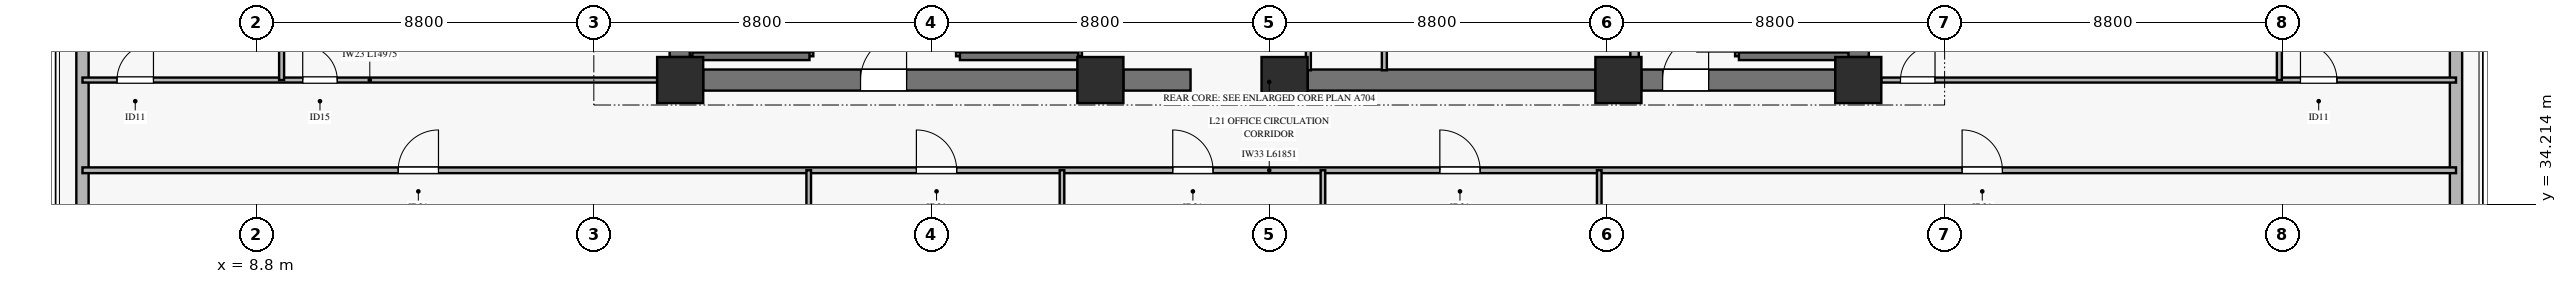
"""IFC4 building model, lengths in metres.
Left out: names, types, materials, properties, quantities, classifications, styles, units other than length and angle.
Written with IfcOpenShell. Run it as: python <this file> out.ifc"""

import sys

from ifc_helpers import new_model, si_unit, direction, frame, frame_2d, origin, origin_2d, place, context, subcontext, project, spatial, rectangle, extrude, source, transform, mapped, element, fill, save


model = new_model("IFC4")
c1 = context("Model", 3, precision=1e-05, world=origin(), true_north=direction((0.0, 1.0)))
c2 = subcontext(c1, "Body", "Model", "MODEL_VIEW")
j1 = project(units=[si_unit("LENGTHUNIT", "METRE"), si_unit("PLANEANGLEUNIT", "RADIAN")], contexts=[c1])
p1 = place(None, origin())
s1 = spatial("IfcSite", under=j1, at=p1, CompositionType="ELEMENT")
p2 = place(p1, origin())
s2 = spatial("IfcBuilding", under=s1, at=p2, CompositionType="ELEMENT")
p3 = place(p2, frame((0.0, 0.0, 87.4)))
s3 = spatial("IfcBuildingStorey", under=s2, at=p3, CompositionType="ELEMENT", Elevation=87.4)
m1 = source(origin(), c2, "Body", "SweptSolid", [
    extrude(rectangle(XDim=1.2, YDim=1.2, at=origin_2d()), origin(), (0.0, 0.0, 1.0), 3.68),
])
for number, where, z_axis, x_axis in (
    (1, (19.85, 37.45, 0.0), (0.0, 0.0, 1.0), (1.0, 0.0, 0.0)),
    (2, (30.8, 37.45, 0.0), (0.0, 0.0, 1.0), (1.0, 0.0, 0.0)),
    (3, (35.6, 37.45, 0.0), (0.0, 0.0, 1.0), (1.0, 0.0, 0.0)),
    (4, (44.3, 37.45, 0.0), (0.0, 0.0, 1.0), (1.0, 0.0, 0.0)),
    (5, (50.55, 37.45, 0.0), (0.0, 0.0, 1.0), (1.0, 0.0, 0.0)),
):
    element("IfcColumn", number, at=place(p3, frame(where, z_axis=z_axis, x_axis=x_axis)), inside=s3, PredefinedType="PILASTER", context=c2, shape_type="MappedRepresentation", body=[
        mapped(m1, transform((0.0, 0.0, 0.0), x_axis=(1.0, 0.0, 0.0), y_axis=(0.0, 1.0, 0.0), z_axis=(0.0, 0.0, 1.0), scale=1.0)),
    ])
p4 = place(p3, frame((20.45, 37.45, 0.0), z_axis=(0.0, 0.0, 1.0), x_axis=(1.0, 0.0, 0.0)))
e6 = element("IfcWall", 6, at=p4, inside=s3, PredefinedType="SHEAR", context=c2, shape_type="SweptSolid", body=[
    extrude(rectangle(XDim=9.75, YDim=0.55, at=frame_2d((4.875, 0.0))), origin(), (0.0, 0.0, 1.0), 3.68),
])
p5 = place(p4, frame((4.1, 0.0, 0.0)))
e7 = element("IfcOpeningElement", 7, at=p5, cuts=e6, PredefinedType="OPENING", context=c2, shape_type="SweptSolid", body=[
    extrude(rectangle(XDim=1.2, YDim=2.15, at=frame_2d((0.6, 1.075))), frame((0.0, 0.285, 0.0), z_axis=(0.0, -1.0, 0.0), x_axis=(1.0, 0.0, 0.0)), (0.0, 0.0, 1.0), 0.57),
])
p6 = place(p3, frame((31.4, 37.45, 0.0), z_axis=(0.0, 0.0, 1.0), x_axis=(1.0, 0.0, 0.0)))
e8 = element("IfcWall", 8, at=p6, inside=s3, PredefinedType="SHEAR", context=c2, shape_type="SweptSolid", body=[
    extrude(rectangle(XDim=1.75, YDim=0.55, at=frame_2d((0.875, 0.0))), origin(), (0.0, 0.0, 1.0), 3.68),
])
p7 = place(p3, frame((36.2, 37.45, 0.0), z_axis=(0.0, 0.0, 1.0), x_axis=(1.0, 0.0, 0.0)))
e9 = element("IfcWall", 9, at=p7, inside=s3, PredefinedType="SHEAR", context=c2, shape_type="SweptSolid", body=[
    extrude(rectangle(XDim=7.5, YDim=0.55, at=frame_2d((3.75, 0.0))), origin(), (0.0, 0.0, 1.0), 3.68),
])
p8 = place(p3, frame((44.9, 37.45, 0.0), z_axis=(0.0, 0.0, 1.0), x_axis=(1.0, 0.0, 0.0)))
e10 = element("IfcWall", 10, at=p8, inside=s3, PredefinedType="SHEAR", context=c2, shape_type="SweptSolid", body=[
    extrude(rectangle(XDim=5.05, YDim=0.55, at=frame_2d((2.525, 0.0))), origin(), (0.0, 0.0, 1.0), 3.68),
])
p9 = place(p8, frame((0.55, 0.0, 0.0)))
e11 = element("IfcOpeningElement", 11, at=p9, cuts=e10, PredefinedType="OPENING", context=c2, shape_type="SweptSolid", body=[
    extrude(rectangle(XDim=1.2, YDim=2.15, at=frame_2d((0.6, 1.075))), frame((0.0, 0.285, 0.0), z_axis=(0.0, -1.0, 0.0), x_axis=(1.0, 0.0, 0.0)), (0.0, 0.0, 1.0), 0.57),
])
for number, where, z_axis, x_axis in (
    (12, (19.85, 38.05, 0.0), (0.0, 0.0, 1.0), (0.0, 1.0, 0.0)),
    (13, (50.55, 38.05, 0.0), (0.0, 0.0, 1.0), (0.0, 1.0, 0.0)),
):
    element("IfcWall", number, at=place(p3, frame(where, z_axis=z_axis, x_axis=x_axis)), inside=s3, PredefinedType="SHEAR", context=c2, shape_type="SweptSolid", body=[
        extrude(rectangle(XDim=7.9, YDim=0.55, at=frame_2d((3.95, 0.0))), origin(), (0.0, 0.0, 1.0), 3.68),
    ])
p10 = place(p3, frame((4.275, 26.518, 0.0), z_axis=(0.0, 0.0, 1.0), x_axis=(0.0, 1.0, 0.0)))
e14 = element("IfcWall", 14, at=p10, inside=s3, PredefinedType="SOLIDWALL", context=c2, shape_type="SweptSolid", body=[
    extrude(rectangle(XDim=16.512, YDim=0.32, at=frame_2d((8.256, 0.0))), origin(), (0.0, 0.0, 1.0), 3.16),
])
p11 = place(p10, frame((4.201, 0.0, 0.45)))
e15 = element("IfcOpeningElement", 15, at=p11, cuts=e14, PredefinedType="OPENING", context=c2, shape_type="SweptSolid", body=[
    extrude(rectangle(XDim=2.4, YDim=2.1, at=frame_2d((1.2, 1.05))), frame((0.0, 0.17, 0.0), z_axis=(0.0, -1.0, 0.0), x_axis=(1.0, 0.0, 0.0)), (0.0, 0.0, 1.0), 0.34),
])
p12 = place(p3, frame((66.126, 26.518, 0.0), z_axis=(0.0, 0.0, 1.0), x_axis=(0.0, 1.0, 0.0)))
e16 = element("IfcWall", 16, at=p12, inside=s3, PredefinedType="SOLIDWALL", context=c2, shape_type="SweptSolid", body=[
    extrude(rectangle(XDim=16.512, YDim=0.32, at=frame_2d((8.256, 0.0))), origin(), (0.0, 0.0, 1.0), 3.16),
])
p13 = place(p12, frame((4.201, 0.0, 0.45)))
e17 = element("IfcOpeningElement", 17, at=p13, cuts=e16, PredefinedType="OPENING", context=c2, shape_type="SweptSolid", body=[
    extrude(rectangle(XDim=2.4, YDim=2.1, at=frame_2d((1.2, 1.05))), frame((0.0, 0.17, 0.0), z_axis=(0.0, -1.0, 0.0), x_axis=(1.0, 0.0, 0.0)), (0.0, 0.0, 1.0), 0.34),
])
p14 = place(p3, frame((20.17, 38.07, 0.0), z_axis=(0.0, 0.0, 1.0), x_axis=(0.0, 1.0, 0.0)))
e18 = element("IfcWall", 18, at=p14, inside=s3, PredefinedType="SOLIDWALL", context=c2, shape_type="SweptSolid", body=[
    extrude(rectangle(XDim=7.25, YDim=0.14, at=frame_2d((3.625, 0.0))), origin(), (0.0, 0.0, 1.0), 3.9),
])
p15 = place(p3, frame((23.22, 38.07, 0.0), z_axis=(0.0, 0.0, 1.0), x_axis=(0.0, 1.0, 0.0)))
e19 = element("IfcWall", 19, at=p15, inside=s3, PredefinedType="SOLIDWALL", context=c2, shape_type="SweptSolid", body=[
    extrude(rectangle(XDim=7.25, YDim=0.2, at=frame_2d((3.625, 0.0))), origin(), (0.0, 0.0, 1.0), 3.9),
])
p16 = place(p15, frame((0.11, 0.0, 0.0)))
e20 = element("IfcOpeningElement", 20, at=p16, cuts=e19, PredefinedType="OPENING", context=c2, shape_type="SweptSolid", body=[
    extrude(rectangle(XDim=1.1, YDim=2.15, at=frame_2d((0.55, 1.075))), frame((0.0, 0.11, 0.0), z_axis=(0.0, -1.0, 0.0), x_axis=(1.0, 0.0, 0.0)), (0.0, 0.0, 1.0), 0.22),
])
p17 = place(p3, frame((20.17, 38.07, 0.0), z_axis=(0.0, 0.0, 1.0), x_axis=(1.0, 0.0, 0.0)))
e21 = element("IfcWall", 21, at=p17, inside=s3, PredefinedType="SOLIDWALL", context=c2, shape_type="SweptSolid", body=[
    extrude(rectangle(XDim=3.05, YDim=0.2, at=frame_2d((1.525, 0.0))), origin(), (0.0, 0.0, 1.0), 3.9),
])
p18 = place(p3, frame((27.14, 38.07, 0.0), z_axis=(0.0, 0.0, 1.0), x_axis=(0.0, 1.0, 0.0)))
e22 = element("IfcWall", 22, at=p18, inside=s3, PredefinedType="SOLIDWALL", context=c2, shape_type="SweptSolid", body=[
    extrude(rectangle(XDim=7.25, YDim=0.2, at=frame_2d((3.625, 0.0))), origin(), (0.0, 0.0, 1.0), 3.9),
])
p19 = place(p18, frame((0.11, 0.0, 0.0)))
e23 = element("IfcOpeningElement", 23, at=p19, cuts=e22, PredefinedType="OPENING", context=c2, shape_type="SweptSolid", body=[
    extrude(rectangle(XDim=1.1, YDim=2.15, at=frame_2d((0.55, 1.075))), frame((0.0, 0.11, 0.0), z_axis=(0.0, -1.0, 0.0), x_axis=(1.0, 0.0, 0.0)), (0.0, 0.0, 1.0), 0.22),
])
p20 = place(p3, frame((30.22, 38.07, 0.0), z_axis=(0.0, 0.0, 1.0), x_axis=(0.0, 1.0, 0.0)))
e24 = element("IfcWall", 24, at=p20, inside=s3, PredefinedType="SOLIDWALL", context=c2, shape_type="SweptSolid", body=[
    extrude(rectangle(XDim=7.25, YDim=0.2, at=frame_2d((3.625, 0.0))), origin(), (0.0, 0.0, 1.0), 3.9),
])
p21 = place(p3, frame((27.14, 38.07, 0.0), z_axis=(0.0, 0.0, 1.0), x_axis=(1.0, 0.0, 0.0)))
e25 = element("IfcWall", 25, at=p21, inside=s3, PredefinedType="SOLIDWALL", context=c2, shape_type="SweptSolid", body=[
    extrude(rectangle(XDim=3.08, YDim=0.2, at=frame_2d((1.54, 0.0))), origin(), (0.0, 0.0, 1.0), 3.9),
])
p22 = place(p3, frame((47.44, 38.07, 0.0), z_axis=(0.0, 0.0, 1.0), x_axis=(0.0, 1.0, 0.0)))
e26 = element("IfcWall", 26, at=p22, inside=s3, PredefinedType="SOLIDWALL", context=c2, shape_type="SweptSolid", body=[
    extrude(rectangle(XDim=7.25, YDim=0.2, at=frame_2d((3.625, 0.0))), origin(), (0.0, 0.0, 1.0), 3.9),
])
p23 = place(p22, frame((0.11, 0.0, 0.0)))
e27 = element("IfcOpeningElement", 27, at=p23, cuts=e26, PredefinedType="OPENING", context=c2, shape_type="SweptSolid", body=[
    extrude(rectangle(XDim=1.1, YDim=2.15, at=frame_2d((0.55, 1.075))), frame((0.0, 0.11, 0.0), z_axis=(0.0, -1.0, 0.0), x_axis=(1.0, 0.0, 0.0)), (0.0, 0.0, 1.0), 0.22),
])
p24 = place(p3, frame((47.44, 38.07, 0.0), z_axis=(0.0, 0.0, 1.0), x_axis=(1.0, 0.0, 0.0)))
e28 = element("IfcWall", 28, at=p24, inside=s3, PredefinedType="SOLIDWALL", context=c2, shape_type="SweptSolid", body=[
    extrude(rectangle(XDim=2.855, YDim=0.2, at=frame_2d((1.427, 0.0))), origin(), (0.0, 0.0, 1.0), 3.9),
])
p25 = place(p3, frame((44.72, 37.705, 0.0), z_axis=(0.0, 0.0, 1.0), x_axis=(0.0, 1.0, 0.0)))
e29 = element("IfcWall", 29, at=p25, inside=s3, PredefinedType="SOLIDWALL", context=c2, shape_type="SweptSolid", body=[
    extrude(rectangle(XDim=7.515, YDim=0.22, at=frame_2d((3.757, 0.0))), origin(), (0.0, 0.0, 1.0), 3.68),
])
p26 = place(p3, frame((36.22, 37.705, 0.0), z_axis=(0.0, 0.0, 1.0), x_axis=(0.0, 1.0, 0.0)))
e30 = element("IfcWall", 30, at=p26, inside=s3, PredefinedType="PARTITIONING", context=c2, shape_type="SweptSolid", body=[
    extrude(rectangle(XDim=2.215, YDim=0.13, at=frame_2d((1.107, 0.0))), origin(), (0.0, 0.0, 1.0), 3.68),
])
p27 = place(p26, frame((0.905, 0.0, 0.0)))
e31 = element("IfcOpeningElement", 31, at=p27, cuts=e30, PredefinedType="OPENING", context=c2, shape_type="SweptSolid", body=[
    extrude(rectangle(XDim=0.9, YDim=2.1, at=frame_2d((0.45, 1.05))), frame((0.0, 0.075, 0.0), z_axis=(0.0, -1.0, 0.0), x_axis=(1.0, 0.0, 0.0)), (0.0, 0.0, 1.0), 0.15),
])
p28 = place(p3, frame((38.2, 37.705, 0.0), z_axis=(0.0, 0.0, 1.0), x_axis=(0.0, 1.0, 0.0)))
e32 = element("IfcWall", 32, at=p28, inside=s3, PredefinedType="PARTITIONING", context=c2, shape_type="SweptSolid", body=[
    extrude(rectangle(XDim=2.215, YDim=0.13, at=frame_2d((1.107, 0.0))), origin(), (0.0, 0.0, 1.0), 3.68),
])
p29 = place(p28, frame((0.615, 0.0, 0.0)))
e33 = element("IfcOpeningElement", 33, at=p29, cuts=e32, PredefinedType="OPENING", context=c2, shape_type="SweptSolid", body=[
    extrude(rectangle(XDim=0.9, YDim=2.1, at=frame_2d((0.45, 1.05))), frame((0.0, 0.075, 0.0), z_axis=(0.0, -1.0, 0.0), x_axis=(1.0, 0.0, 0.0)), (0.0, 0.0, 1.0), 0.15),
])
p30 = place(p3, frame((4.275, 35.1, 0.0), z_axis=(0.0, 0.0, 1.0), x_axis=(1.0, 0.0, 0.0)))
e34 = element("IfcWall", 34, at=p30, inside=s3, PredefinedType="PARTITIONING", context=c2, shape_type="SweptSolid", body=[
    extrude(rectangle(XDim=61.851, YDim=0.15, at=frame_2d((30.926, 0.0))), origin(), (0.0, 0.0, 1.0), 2.765),
])
p31 = place(p30, frame((8.227, 0.0, 0.0)))
e35 = element("IfcOpeningElement", 35, at=p31, cuts=e34, PredefinedType="OPENING", context=c2, shape_type="SweptSolid", body=[
    extrude(rectangle(XDim=1.05, YDim=2.15, at=frame_2d((0.525, 1.075))), frame((0.0, 0.085, 0.0), z_axis=(0.0, -1.0, 0.0), x_axis=(1.0, 0.0, 0.0)), (0.0, 0.0, 1.0), 0.17),
])
p32 = place(p30, frame((21.731, 0.0, 0.0)))
e36 = element("IfcOpeningElement", 36, at=p32, cuts=e34, PredefinedType="OPENING", context=c2, shape_type="SweptSolid", body=[
    extrude(rectangle(XDim=1.05, YDim=2.15, at=frame_2d((0.525, 1.075))), frame((0.0, 0.085, 0.0), z_axis=(0.0, -1.0, 0.0), x_axis=(1.0, 0.0, 0.0)), (0.0, 0.0, 1.0), 0.17),
])
p33 = place(p30, frame((28.411, 0.0, 0.0)))
e37 = element("IfcOpeningElement", 37, at=p33, cuts=e34, PredefinedType="OPENING", context=c2, shape_type="SweptSolid", body=[
    extrude(rectangle(XDim=1.05, YDim=2.15, at=frame_2d((0.525, 1.075))), frame((0.0, 0.085, 0.0), z_axis=(0.0, -1.0, 0.0), x_axis=(1.0, 0.0, 0.0)), (0.0, 0.0, 1.0), 0.17),
])
p34 = place(p30, frame((35.371, 0.0, 0.0)))
e38 = element("IfcOpeningElement", 38, at=p34, cuts=e34, PredefinedType="OPENING", context=c2, shape_type="SweptSolid", body=[
    extrude(rectangle(XDim=1.05, YDim=2.15, at=frame_2d((0.525, 1.075))), frame((0.0, 0.085, 0.0), z_axis=(0.0, -1.0, 0.0), x_axis=(1.0, 0.0, 0.0)), (0.0, 0.0, 1.0), 0.17),
])
p35 = place(p30, frame((48.981, 0.0, 0.0)))
e39 = element("IfcOpeningElement", 39, at=p35, cuts=e34, PredefinedType="OPENING", context=c2, shape_type="SweptSolid", body=[
    extrude(rectangle(XDim=1.05, YDim=2.15, at=frame_2d((0.525, 1.075))), frame((0.0, 0.085, 0.0), z_axis=(0.0, -1.0, 0.0), x_axis=(1.0, 0.0, 0.0)), (0.0, 0.0, 1.0), 0.17),
])
for number, where, z_axis, x_axis in (
    (40, (23.2, 5.936, 0.0), (0.0, 0.0, 1.0), (0.0, 1.0, 0.0)),
    (41, (29.8, 5.936, 0.0), (0.0, 0.0, 1.0), (0.0, 1.0, 0.0)),
    (42, (36.6, 5.936, 0.0), (0.0, 0.0, 1.0), (0.0, 1.0, 0.0)),
):
    element("IfcWall", number, at=place(p3, frame(where, z_axis=z_axis, x_axis=x_axis)), inside=s3, PredefinedType="PARTITIONING", context=c2, shape_type="SweptSolid", body=[
        extrude(rectangle(XDim=29.164, YDim=0.12, at=frame_2d((14.582, 0.0))), origin(), (0.0, 0.0, 1.0), 3.165),
    ])
p36 = place(p3, frame((43.8, 5.936, 0.0), z_axis=(0.0, 0.0, 1.0), x_axis=(0.0, 1.0, 0.0)))
e43 = element("IfcWall", 43, at=p36, inside=s3, PredefinedType="PARTITIONING", context=c2, shape_type="SweptSolid", body=[
    extrude(rectangle(XDim=29.164, YDim=0.12, at=frame_2d((14.582, 0.0))), origin(), (0.0, 0.0, 1.0), 3.215),
])
p37 = place(p3, frame((4.275, 37.45, 0.0), z_axis=(0.0, 0.0, 1.0), x_axis=(1.0, 0.0, 0.0)))
e44 = element("IfcWall", 44, at=p37, inside=s3, PredefinedType="PARTITIONING", context=c2, shape_type="SweptSolid", body=[
    extrude(rectangle(XDim=14.975, YDim=0.13, at=frame_2d((7.488, 0.0))), origin(), (0.0, 0.0, 1.0), 3.165),
])
p38 = place(p37, frame((0.9, 0.0, 0.0)))
e45 = element("IfcOpeningElement", 45, at=p38, cuts=e44, PredefinedType="OPENING", context=c2, shape_type="SweptSolid", body=[
    extrude(rectangle(XDim=0.95, YDim=2.1, at=frame_2d((0.475, 1.05))), frame((0.0, 0.075, 0.0), z_axis=(0.0, -1.0, 0.0), x_axis=(1.0, 0.0, 0.0)), (0.0, 0.0, 1.0), 0.15),
])
p39 = place(p37, frame((5.739, 0.0, 0.0)))
e46 = element("IfcOpeningElement", 46, at=p39, cuts=e44, PredefinedType="OPENING", context=c2, shape_type="SweptSolid", body=[
    extrude(rectangle(XDim=0.9, YDim=2.1, at=frame_2d((0.45, 1.05))), frame((0.0, 0.075, 0.0), z_axis=(0.0, -1.0, 0.0), x_axis=(1.0, 0.0, 0.0)), (0.0, 0.0, 1.0), 0.15),
])
p40 = place(p3, frame((9.464, 37.45, 0.0), z_axis=(0.0, 0.0, 1.0), x_axis=(0.0, 1.0, 0.0)))
e47 = element("IfcWall", 47, at=p40, inside=s3, PredefinedType="PARTITIONING", context=c2, shape_type="SweptSolid", body=[
    extrude(rectangle(XDim=8.8, YDim=0.13, at=frame_2d((4.4, 0.0))), origin(), (0.0, 0.0, 1.0), 3.68),
])
p41 = place(p3, frame((51.15, 37.45, 0.0), z_axis=(0.0, 0.0, 1.0), x_axis=(1.0, 0.0, 0.0)))
e48 = element("IfcWall", 48, at=p41, inside=s3, PredefinedType="PARTITIONING", context=c2, shape_type="SweptSolid", body=[
    extrude(rectangle(XDim=14.976, YDim=0.13, at=frame_2d((7.488, 0.0))), origin(), (0.0, 0.0, 1.0), 3.165),
])
p42 = place(p41, frame((0.5, 0.0, 0.0)))
e49 = element("IfcOpeningElement", 49, at=p42, cuts=e48, PredefinedType="OPENING", context=c2, shape_type="SweptSolid", body=[
    extrude(rectangle(XDim=0.9, YDim=2.1, at=frame_2d((0.45, 1.05))), frame((0.0, 0.075, 0.0), z_axis=(0.0, -1.0, 0.0), x_axis=(1.0, 0.0, 0.0)), (0.0, 0.0, 1.0), 0.15),
])
p43 = place(p41, frame((10.923, 0.0, 0.0)))
e50 = element("IfcOpeningElement", 50, at=p43, cuts=e48, PredefinedType="OPENING", context=c2, shape_type="SweptSolid", body=[
    extrude(rectangle(XDim=0.95, YDim=2.1, at=frame_2d((0.475, 1.05))), frame((0.0, 0.075, 0.0), z_axis=(0.0, -1.0, 0.0), x_axis=(1.0, 0.0, 0.0)), (0.0, 0.0, 1.0), 0.15),
])
p44 = place(p3, frame((61.523, 37.45, 0.0), z_axis=(0.0, 0.0, 1.0), x_axis=(0.0, 1.0, 0.0)))
e51 = element("IfcWall", 51, at=p44, inside=s3, PredefinedType="PARTITIONING", context=c2, shape_type="SweptSolid", body=[
    extrude(rectangle(XDim=8.8, YDim=0.13, at=frame_2d((4.4, 0.0))), origin(), (0.0, 0.0, 1.0), 3.68),
])
m2 = source(origin(), c2, "Body", "SweptSolid", [
    extrude(rectangle(XDim=1.2, YDim=2.15, at=frame_2d((0.6, 1.075))), frame((0.0, 0.025, 0.0), z_axis=(0.0, -1.0, 0.0), x_axis=(1.0, 0.0, 0.0)), (0.0, 0.0, 1.0), 0.05),
])
p45 = place(p5, origin())
e52 = element("IfcDoor", 52, at=p45, inside=s3, OperationType="SINGLE_SWING_RIGHT", PredefinedType="DOOR", context=c2, shape_type="MappedRepresentation", body=[
    mapped(m2, transform((0.0, 0.0, 0.0), x_axis=(1.0, 0.0, 0.0), y_axis=(0.0, 1.0, 0.0), z_axis=(0.0, 0.0, 1.0), scale=1.0)),
])
fill(e7, e52)
p46 = place(p9, origin())
e53 = element("IfcDoor", 53, at=p46, inside=s3, OperationType="SINGLE_SWING_RIGHT", PredefinedType="DOOR", context=c2, shape_type="MappedRepresentation", body=[
    mapped(m2, transform((0.0, 0.0, 0.0), x_axis=(1.0, 0.0, 0.0), y_axis=(0.0, 1.0, 0.0), z_axis=(0.0, 0.0, 1.0), scale=1.0)),
])
fill(e11, e53)
m3 = source(origin(), c2, "Body", "SweptSolid", [
    extrude(rectangle(XDim=1.05, YDim=2.15, at=frame_2d((0.525, 1.075))), frame((0.0, 0.025, 0.0), z_axis=(0.0, -1.0, 0.0), x_axis=(1.0, 0.0, 0.0)), (0.0, 0.0, 1.0), 0.05),
])
p47 = place(p31, origin())
e54 = element("IfcDoor", 54, at=p47, inside=s3, OperationType="SINGLE_SWING_RIGHT", PredefinedType="DOOR", context=c2, shape_type="MappedRepresentation", body=[
    mapped(m3, transform((0.0, 0.0, 0.0), x_axis=(1.0, 0.0, 0.0), y_axis=(0.0, 1.0, 0.0), z_axis=(0.0, 0.0, 1.0), scale=1.0)),
])
fill(e35, e54)
p48 = place(p32, origin())
e55 = element("IfcDoor", 55, at=p48, inside=s3, OperationType="SINGLE_SWING_LEFT", PredefinedType="DOOR", context=c2, shape_type="MappedRepresentation", body=[
    mapped(m3, transform((0.0, 0.0, 0.0), x_axis=(1.0, 0.0, 0.0), y_axis=(0.0, 1.0, 0.0), z_axis=(0.0, 0.0, 1.0), scale=1.0)),
])
fill(e36, e55)
p49 = place(p33, origin())
e56 = element("IfcDoor", 56, at=p49, inside=s3, OperationType="SINGLE_SWING_LEFT", PredefinedType="DOOR", context=c2, shape_type="MappedRepresentation", body=[
    mapped(m3, transform((0.0, 0.0, 0.0), x_axis=(1.0, 0.0, 0.0), y_axis=(0.0, 1.0, 0.0), z_axis=(0.0, 0.0, 1.0), scale=1.0)),
])
fill(e37, e56)
p50 = place(p34, origin())
e57 = element("IfcDoor", 57, at=p50, inside=s3, OperationType="SINGLE_SWING_LEFT", PredefinedType="DOOR", context=c2, shape_type="MappedRepresentation", body=[
    mapped(m3, transform((0.0, 0.0, 0.0), x_axis=(1.0, 0.0, 0.0), y_axis=(0.0, 1.0, 0.0), z_axis=(0.0, 0.0, 1.0), scale=1.0)),
])
fill(e38, e57)
p51 = place(p35, origin())
e58 = element("IfcDoor", 58, at=p51, inside=s3, OperationType="SINGLE_SWING_LEFT", PredefinedType="DOOR", context=c2, shape_type="MappedRepresentation", body=[
    mapped(m3, transform((0.0, 0.0, 0.0), x_axis=(1.0, 0.0, 0.0), y_axis=(0.0, 1.0, 0.0), z_axis=(0.0, 0.0, 1.0), scale=1.0)),
])
fill(e39, e58)
m4 = source(origin(), c2, "Body", "SweptSolid", [
    extrude(rectangle(XDim=0.95, YDim=2.1, at=frame_2d((0.475, 1.05))), frame((0.0, 0.025, 0.0), z_axis=(0.0, -1.0, 0.0), x_axis=(1.0, 0.0, 0.0)), (0.0, 0.0, 1.0), 0.05),
])
p52 = place(p38, origin())
e59 = element("IfcDoor", 59, at=p52, inside=s3, OperationType="SINGLE_SWING_RIGHT", PredefinedType="DOOR", context=c2, shape_type="MappedRepresentation", body=[
    mapped(m4, transform((0.0, 0.0, 0.0), x_axis=(1.0, 0.0, 0.0), y_axis=(0.0, 1.0, 0.0), z_axis=(0.0, 0.0, 1.0), scale=1.0)),
])
fill(e45, e59)
m5 = source(origin(), c2, "Body", "SweptSolid", [
    extrude(rectangle(XDim=0.9, YDim=2.1, at=frame_2d((0.45, 1.05))), frame((0.0, 0.025, 0.0), z_axis=(0.0, -1.0, 0.0), x_axis=(1.0, 0.0, 0.0)), (0.0, 0.0, 1.0), 0.05),
])
p53 = place(p39, origin())
e60 = element("IfcDoor", 60, at=p53, inside=s3, OperationType="SINGLE_SWING_LEFT", PredefinedType="DOOR", context=c2, shape_type="MappedRepresentation", body=[
    mapped(m5, transform((0.0, 0.0, 0.0), x_axis=(1.0, 0.0, 0.0), y_axis=(0.0, 1.0, 0.0), z_axis=(0.0, 0.0, 1.0), scale=1.0)),
])
fill(e46, e60)
p54 = place(p42, origin())
e61 = element("IfcDoor", 61, at=p54, inside=s3, OperationType="SINGLE_SWING_RIGHT", PredefinedType="DOOR", context=c2, shape_type="MappedRepresentation", body=[
    mapped(m5, transform((0.0, 0.0, 0.0), x_axis=(1.0, 0.0, 0.0), y_axis=(0.0, 1.0, 0.0), z_axis=(0.0, 0.0, 1.0), scale=1.0)),
])
fill(e49, e61)
p55 = place(p43, origin())
e62 = element("IfcDoor", 62, at=p55, inside=s3, OperationType="SINGLE_SWING_LEFT", PredefinedType="DOOR", context=c2, shape_type="MappedRepresentation", body=[
    mapped(m4, transform((0.0, 0.0, 0.0), x_axis=(1.0, 0.0, 0.0), y_axis=(0.0, 1.0, 0.0), z_axis=(0.0, 0.0, 1.0), scale=1.0)),
])
fill(e50, e62)
save(model, sys.argv[1])
